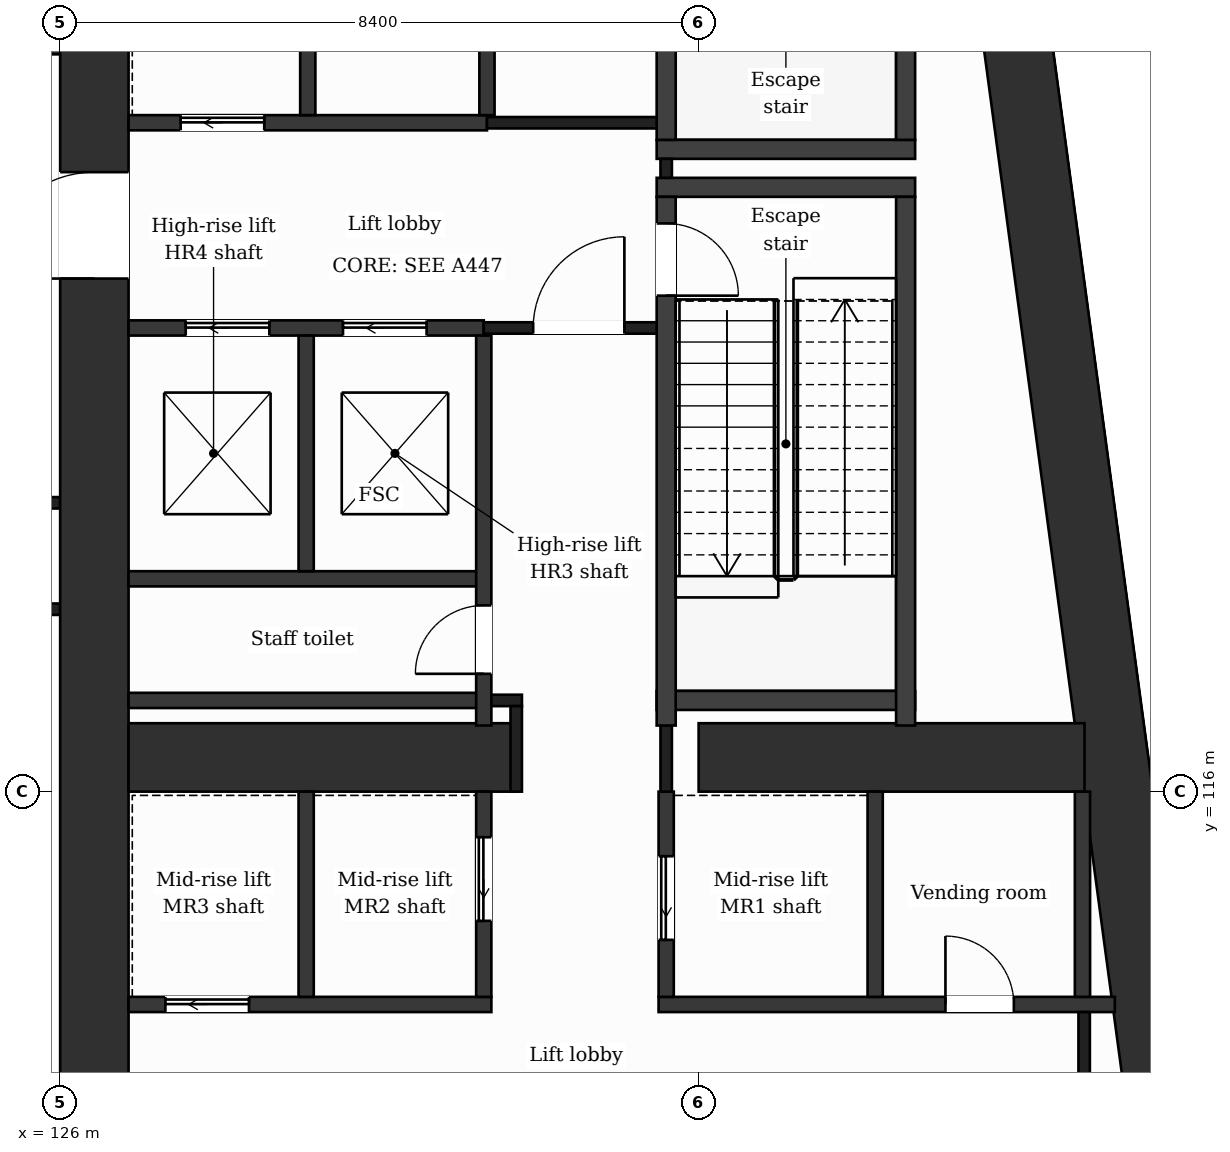
"""IFC4 building model, lengths in metres.
Left out: names, types, materials, properties, quantities, classifications, styles, units other than length and angle.
Written with IfcOpenShell. Run it as: python <this file> out.ifc"""

import sys

from ifc_helpers import new_model, si_unit, direction, frame, frame_2d, origin, place, context, subcontext, project, spatial, rectangle, extrude, element, fill, save


model = new_model("IFC4")
c1 = context("Model", 3, precision=1e-05, world=origin(), true_north=direction((0.0, 1.0)))
c2 = subcontext(c1, "Body", "Model", "MODEL_VIEW")
j1 = project(units=[si_unit("LENGTHUNIT", "METRE"), si_unit("PLANEANGLEUNIT", "RADIAN")], contexts=[c1])
p1 = place(None, origin())
s1 = spatial("IfcSite", under=j1, at=p1, CompositionType="ELEMENT")
p2 = place(p1, origin())
s2 = spatial("IfcBuilding", under=s1, at=p2, CompositionType="ELEMENT")
p3 = place(p2, frame((0.0, 0.0, 192.2)))
s3 = spatial("IfcBuildingStorey", under=s2, at=p3, CompositionType="ELEMENT", Elevation=192.2)
p4 = place(p3, frame((137.776, 131.95, 0.0), z_axis=(0.0, 0.0, 1.0), x_axis=(0.133421759112, -0.991059349482, 0.0)))
e1 = element("IfcWall", 1, at=p4, inside=s3, PredefinedType="SHEAR", context=c2, shape_type="SweptSolid", body=[
    extrude(rectangle(XDim=21.29, YDim=0.9, at=frame_2d((10.645, 0.0))), origin(), (0.0, 0.0, 1.0), 5.0),
])
p5 = place(p3, frame((126.45, 110.85, 0.0), z_axis=(0.0, 0.0, 1.0), x_axis=(0.0, 1.0, 0.0)))
e2 = element("IfcWall", 2, at=p5, inside=s3, PredefinedType="SHEAR", context=c2, shape_type="SweptSolid", body=[
    extrude(rectangle(XDim=21.1, YDim=0.9, at=frame_2d((10.55, 0.0))), origin(), (0.0, 0.0, 1.0), 5.0),
])
p6 = place(p5, frame((11.9, 0.0, 0.0)))
e3 = element("IfcOpeningElement", 3, at=p6, cuts=e2, PredefinedType="OPENING", context=c2, shape_type="SweptSolid", body=[
    extrude(rectangle(XDim=1.4, YDim=2.1, at=frame_2d((0.7, 1.05))), frame((0.0, 0.46, 0.0), z_axis=(0.0, -1.0, 0.0), x_axis=(1.0, 0.0, 0.0)), (0.0, 0.0, 1.0), 0.92),
])
p7 = place(p3, frame((126.9, 116.45, 0.0), z_axis=(0.0, 0.0, 1.0), x_axis=(1.0, 0.0, 0.0)))
e4 = element("IfcWall", 4, at=p7, inside=s3, PredefinedType="SHEAR", context=c2, shape_type="SweptSolid", body=[
    extrude(rectangle(XDim=5.1, YDim=0.9, at=frame_2d((2.55, 0.0))), origin(), (0.0, 0.0, 1.0), 5.0),
])
p8 = place(p3, frame((134.4, 116.45, 0.0), z_axis=(0.0, 0.0, 1.0), x_axis=(1.0, 0.0, 0.0)))
e5 = element("IfcWall", 5, at=p8, inside=s3, PredefinedType="SHEAR", context=c2, shape_type="SweptSolid", body=[
    extrude(rectangle(XDim=5.077, YDim=0.9, at=frame_2d((2.539, 0.0))), origin(), (0.0, 0.0, 1.0), 5.0),
])
p9 = place(p3, frame((126.9, 113.2, 0.0), z_axis=(0.0, 0.0, 1.0), x_axis=(1.0, 0.0, 0.0)))
e6 = element("IfcWall", 6, at=p9, inside=s3, PredefinedType="PARTITIONING", context=c2, shape_type="SweptSolid", body=[
    extrude(rectangle(XDim=4.773, YDim=0.2, at=frame_2d((2.387, 0.0))), origin(), (0.0, 0.0, 1.0), 4.5),
])
p10 = place(p9, frame((0.484, 0.0, 0.0)))
e7 = element("IfcOpeningElement", 7, at=p10, cuts=e6, PredefinedType="OPENING", context=c2, shape_type="SweptSolid", body=[
    extrude(rectangle(XDim=1.1, YDim=2.1, at=frame_2d((0.55, 1.05))), frame((0.0, 0.11, 0.0), z_axis=(0.0, -1.0, 0.0), x_axis=(1.0, 0.0, 0.0)), (0.0, 0.0, 1.0), 0.22),
])
p11 = place(p3, frame((133.873, 113.2, 0.0), z_axis=(0.0, 0.0, 1.0), x_axis=(1.0, 0.0, 0.0)))
e8 = element("IfcWall", 8, at=p11, inside=s3, PredefinedType="PARTITIONING", context=c2, shape_type="SweptSolid", body=[
    extrude(rectangle(XDim=6.003, YDim=0.2, at=frame_2d((3.001, 0.0))), origin(), (0.0, 0.0, 1.0), 4.5),
])
p12 = place(p11, frame((3.774, 0.0, 0.0)))
e9 = element("IfcOpeningElement", 9, at=p12, cuts=e8, PredefinedType="OPENING", context=c2, shape_type="SweptSolid", body=[
    extrude(rectangle(XDim=0.9, YDim=2.1, at=frame_2d((0.45, 1.05))), frame((0.0, 0.11, 0.0), z_axis=(0.0, -1.0, 0.0), x_axis=(1.0, 0.0, 0.0)), (0.0, 0.0, 1.0), 0.22),
])
p13 = place(p3, frame((126.9, 117.2, 0.0), z_axis=(0.0, 0.0, 1.0), x_axis=(1.0, 0.0, 0.0)))
e10 = element("IfcWall", 10, at=p13, inside=s3, PredefinedType="PARTITIONING", context=c2, shape_type="SweptSolid", body=[
    extrude(rectangle(XDim=4.673, YDim=0.2, at=frame_2d((2.336, 0.0))), origin(), (0.0, 0.0, 1.0), 4.5),
])
p14 = place(p3, frame((131.573, 117.2, 0.0), z_axis=(0.0, 0.0, 1.0), x_axis=(1.0, 0.0, 0.0)))
e11 = element("IfcWall", 11, at=p14, inside=s3, PredefinedType="PARTITIONING", context=c2, shape_type="SweptSolid", body=[
    extrude(rectangle(XDim=0.502, YDim=0.15, at=frame_2d((0.251, 0.0))), origin(), (0.0, 0.0, 1.0), 4.5),
])
p15 = place(p3, frame((133.848, 117.2, 0.0), z_axis=(0.0, 0.0, 1.0), x_axis=(1.0, 0.0, 0.0)))
e12 = element("IfcWall", 12, at=p15, inside=s3, PredefinedType="PARTITIONING", context=c2, shape_type="SweptSolid", body=[
    extrude(rectangle(XDim=3.4, YDim=0.25, at=frame_2d((1.7, 0.0))), origin(), (0.0, 0.0, 1.0), 4.5),
])
p16 = place(p3, frame((107.925, 118.4, 0.0), z_axis=(0.0, 0.0, 1.0), x_axis=(1.0, 0.0, 0.0)))
e13 = element("IfcWall", 13, at=p16, inside=s3, PredefinedType="PARTITIONING", context=c2, shape_type="SweptSolid", body=[
    extrude(rectangle(XDim=18.075, YDim=0.15, at=frame_2d((9.038, 0.0))), origin(), (0.0, 0.0, 1.0), 4.5),
])
p17 = place(p16, frame((8.475, 0.0, 0.0)))
e14 = element("IfcOpeningElement", 14, at=p17, cuts=e13, PredefinedType="OPENING", context=c2, shape_type="SweptSolid", body=[
    extrude(rectangle(XDim=1.2, YDim=2.1, at=frame_2d((0.6, 1.05))), frame((0.0, 0.085, 0.0), z_axis=(0.0, -1.0, 0.0), x_axis=(1.0, 0.0, 0.0)), (0.0, 0.0, 1.0), 0.17),
])
p18 = place(p3, frame((126.9, 118.8, 0.0), z_axis=(0.0, 0.0, 1.0), x_axis=(1.0, 0.0, 0.0)))
e15 = element("IfcWall", 15, at=p18, inside=s3, PredefinedType="PARTITIONING", context=c2, shape_type="SweptSolid", body=[
    extrude(rectangle(XDim=4.673, YDim=0.2, at=frame_2d((2.336, 0.0))), origin(), (0.0, 0.0, 1.0), 4.5),
])
p19 = place(p3, frame((120.125, 119.8, 0.0), z_axis=(0.0, 0.0, 1.0), x_axis=(1.0, 0.0, 0.0)))
e16 = element("IfcWall", 16, at=p19, inside=s3, PredefinedType="PARTITIONING", context=c2, shape_type="SweptSolid", body=[
    extrude(rectangle(XDim=5.875, YDim=0.15, at=frame_2d((2.938, 0.0))), origin(), (0.0, 0.0, 1.0), 4.5),
])
p20 = place(p3, frame((126.9, 122.1, 0.0), z_axis=(0.0, 0.0, 1.0), x_axis=(1.0, 0.0, 0.0)))
e17 = element("IfcWall", 17, at=p20, inside=s3, PredefinedType="PARTITIONING", context=c2, shape_type="SweptSolid", body=[
    extrude(rectangle(XDim=4.673, YDim=0.2, at=frame_2d((2.336, 0.0))), origin(), (0.0, 0.0, 1.0), 4.5),
])
p21 = place(p20, frame((2.821, 0.0, 0.0)))
e18 = element("IfcOpeningElement", 18, at=p21, cuts=e17, PredefinedType="OPENING", context=c2, shape_type="SweptSolid", body=[
    extrude(rectangle(XDim=1.1, YDim=2.1, at=frame_2d((0.55, 1.05))), frame((0.0, 0.11, 0.0), z_axis=(0.0, -1.0, 0.0), x_axis=(1.0, 0.0, 0.0)), (0.0, 0.0, 1.0), 0.22),
])
p22 = place(p20, frame((0.752, 0.0, 0.0)))
e19 = element("IfcOpeningElement", 19, at=p22, cuts=e17, PredefinedType="OPENING", context=c2, shape_type="SweptSolid", body=[
    extrude(rectangle(XDim=1.1, YDim=2.1, at=frame_2d((0.55, 1.05))), frame((0.0, 0.11, 0.0), z_axis=(0.0, -1.0, 0.0), x_axis=(1.0, 0.0, 0.0)), (0.0, 0.0, 1.0), 0.22),
])
p23 = place(p3, frame((131.573, 122.1, 0.0), z_axis=(0.0, 0.0, 1.0), x_axis=(1.0, 0.0, 0.0)))
e20 = element("IfcWall", 20, at=p23, inside=s3, PredefinedType="PARTITIONING", context=c2, shape_type="SweptSolid", body=[
    extrude(rectangle(XDim=2.4, YDim=0.15, at=frame_2d((1.2, 0.0))), origin(), (0.0, 0.0, 1.0), 4.5),
])
p24 = place(p23, frame((0.65, 0.0, 0.0)))
e21 = element("IfcOpeningElement", 21, at=p24, cuts=e20, PredefinedType="OPENING", context=c2, shape_type="SweptSolid", body=[
    extrude(rectangle(XDim=1.2, YDim=2.1, at=frame_2d((0.6, 1.05))), frame((0.0, 0.085, 0.0), z_axis=(0.0, -1.0, 0.0), x_axis=(1.0, 0.0, 0.0)), (0.0, 0.0, 1.0), 0.17),
])
for number, where, z_axis, x_axis in (
    (22, (133.848, 123.95, 0.0), (0.0, 0.0, 1.0), (1.0, 0.0, 0.0)),
    (23, (133.848, 124.45, 0.0), (0.0, 0.0, 1.0), (1.0, 0.0, 0.0)),
):
    element("IfcWall", number, at=place(p3, frame(where, z_axis=z_axis, x_axis=x_axis)), inside=s3, PredefinedType="PARTITIONING", context=c2, shape_type="SweptSolid", body=[
        extrude(rectangle(XDim=3.4, YDim=0.25, at=frame_2d((1.7, 0.0))), origin(), (0.0, 0.0, 1.0), 4.5),
    ])
p25 = place(p3, frame((126.9, 124.8, 0.0), z_axis=(0.0, 0.0, 1.0), x_axis=(1.0, 0.0, 0.0)))
e24 = element("IfcWall", 24, at=p25, inside=s3, PredefinedType="PARTITIONING", context=c2, shape_type="SweptSolid", body=[
    extrude(rectangle(XDim=4.715, YDim=0.2, at=frame_2d((2.358, 0.0))), origin(), (0.0, 0.0, 1.0), 4.5),
])
p26 = place(p25, frame((0.685, 0.0, 0.0)))
e25 = element("IfcOpeningElement", 25, at=p26, cuts=e24, PredefinedType="OPENING", context=c2, shape_type="SweptSolid", body=[
    extrude(rectangle(XDim=1.1, YDim=2.1, at=frame_2d((0.55, 1.05))), frame((0.0, 0.11, 0.0), z_axis=(0.0, -1.0, 0.0), x_axis=(1.0, 0.0, 0.0)), (0.0, 0.0, 1.0), 0.22),
])
p27 = place(p3, frame((131.615, 124.8, 0.0), z_axis=(0.0, 0.0, 1.0), x_axis=(1.0, 0.0, 0.0)))
e26 = element("IfcWall", 26, at=p27, inside=s3, PredefinedType="PARTITIONING", context=c2, shape_type="SweptSolid", body=[
    extrude(rectangle(XDim=2.483, YDim=0.15, at=frame_2d((1.241, 0.0))), origin(), (0.0, 0.0, 1.0), 4.5),
])
p28 = place(p3, frame((120.2, 125.8, 0.0), z_axis=(0.0, 0.0, 1.0), x_axis=(1.0, 0.0, 0.0)))
e27 = element("IfcWall", 27, at=p28, inside=s3, PredefinedType="PARTITIONING", context=c2, shape_type="SweptSolid", body=[
    extrude(rectangle(XDim=5.8, YDim=0.2, at=frame_2d((2.9, 0.0))), origin(), (0.0, 0.0, 1.0), 4.5),
])
p29 = place(p3, frame((129.237, 113.3, 0.0), z_axis=(0.0, 0.0, 1.0), x_axis=(0.0, 1.0, 0.0)))
e28 = element("IfcWall", 28, at=p29, inside=s3, PredefinedType="PARTITIONING", context=c2, shape_type="SweptSolid", body=[
    extrude(rectangle(XDim=2.7, YDim=0.2, at=frame_2d((1.35, 0.0))), origin(), (0.0, 0.0, 1.0), 4.5),
])
for number, where, z_axis, x_axis in (
    (29, (129.237, 118.9, 0.0), (0.0, 0.0, 1.0), (0.0, 1.0, 0.0)),
    (30, (129.258, 124.9, 0.0), (0.0, 0.0, 1.0), (0.0, 1.0, 0.0)),
):
    element("IfcWall", number, at=place(p3, frame(where, z_axis=z_axis, x_axis=x_axis)), inside=s3, PredefinedType="PARTITIONING", context=c2, shape_type="SweptSolid", body=[
        extrude(rectangle(XDim=3.1, YDim=0.2, at=frame_2d((1.55, 0.0))), origin(), (0.0, 0.0, 1.0), 4.5),
    ])
p30 = place(p3, frame((131.573, 113.3, 0.0), z_axis=(0.0, 0.0, 1.0), x_axis=(0.0, 1.0, 0.0)))
e31 = element("IfcWall", 31, at=p30, inside=s3, PredefinedType="PARTITIONING", context=c2, shape_type="SweptSolid", body=[
    extrude(rectangle(XDim=2.7, YDim=0.2, at=frame_2d((1.35, 0.0))), origin(), (0.0, 0.0, 1.0), 4.5),
])
p31 = place(p30, frame((1.0, 0.0, 0.0)))
e32 = element("IfcOpeningElement", 32, at=p31, cuts=e31, PredefinedType="OPENING", context=c2, shape_type="SweptSolid", body=[
    extrude(rectangle(XDim=1.1, YDim=2.1, at=frame_2d((0.55, 1.05))), frame((0.0, 0.11, 0.0), z_axis=(0.0, -1.0, 0.0), x_axis=(1.0, 0.0, 0.0)), (0.0, 0.0, 1.0), 0.22),
])
p32 = place(p3, frame((131.573, 116.87, 0.0), z_axis=(0.0, 0.0, 1.0), x_axis=(0.0, 1.0, 0.0)))
e33 = element("IfcWall", 33, at=p32, inside=s3, PredefinedType="PARTITIONING", context=c2, shape_type="SweptSolid", body=[
    extrude(rectangle(XDim=5.13, YDim=0.2, at=frame_2d((2.565, 0.0))), origin(), (0.0, 0.0, 1.0), 4.5),
])
p33 = place(p32, frame((0.68, 0.0, 0.0)))
e34 = element("IfcOpeningElement", 34, at=p33, cuts=e33, PredefinedType="OPENING", context=c2, shape_type="SweptSolid", body=[
    extrude(rectangle(XDim=0.9, YDim=2.1, at=frame_2d((0.45, 1.05))), frame((0.0, 0.11, 0.0), z_axis=(0.0, -1.0, 0.0), x_axis=(1.0, 0.0, 0.0)), (0.0, 0.0, 1.0), 0.22),
])
p34 = place(p3, frame((131.615, 124.9, 0.0), z_axis=(0.0, 0.0, 1.0), x_axis=(0.0, 1.0, 0.0)))
e35 = element("IfcWall", 35, at=p34, inside=s3, PredefinedType="PARTITIONING", context=c2, shape_type="SweptSolid", body=[
    extrude(rectangle(XDim=3.1, YDim=0.2, at=frame_2d((1.55, 0.0))), origin(), (0.0, 0.0, 1.0), 4.5),
])
p35 = place(p3, frame((132.0, 116.0, 0.0), z_axis=(0.0, 0.0, 1.0), x_axis=(0.0, 1.0, 0.0)))
e36 = element("IfcWall", 36, at=p35, inside=s3, PredefinedType="PARTITIONING", context=c2, shape_type="SweptSolid", body=[
    extrude(rectangle(XDim=1.125, YDim=0.15, at=frame_2d((0.562, 0.0))), origin(), (0.0, 0.0, 1.0), 4.5),
])
p36 = place(p3, frame((133.973, 113.3, 0.0), z_axis=(0.0, 0.0, 1.0), x_axis=(0.0, 1.0, 0.0)))
e37 = element("IfcWall", 37, at=p36, inside=s3, PredefinedType="PARTITIONING", context=c2, shape_type="SweptSolid", body=[
    extrude(rectangle(XDim=2.7, YDim=0.2, at=frame_2d((1.35, 0.0))), origin(), (0.0, 0.0, 1.0), 4.5),
])
p37 = place(p36, frame((0.75, 0.0, 0.0)))
e38 = element("IfcOpeningElement", 38, at=p37, cuts=e37, PredefinedType="OPENING", context=c2, shape_type="SweptSolid", body=[
    extrude(rectangle(XDim=1.1, YDim=2.1, at=frame_2d((0.55, 1.05))), frame((0.0, 0.11, 0.0), z_axis=(0.0, -1.0, 0.0), x_axis=(1.0, 0.0, 0.0)), (0.0, 0.0, 1.0), 0.22),
])
p38 = place(p3, frame((133.973, 116.0, 0.0), z_axis=(0.0, 0.0, 1.0), x_axis=(0.0, 1.0, 0.0)))
e39 = element("IfcWall", 39, at=p38, inside=s3, PredefinedType="PARTITIONING", context=c2, shape_type="SweptSolid", body=[
    extrude(rectangle(XDim=0.87, YDim=0.15, at=frame_2d((0.435, 0.0))), origin(), (0.0, 0.0, 1.0), 4.5),
])
p39 = place(p3, frame((133.973, 124.075, 0.0), z_axis=(0.0, 0.0, 1.0), x_axis=(0.0, 1.0, 0.0)))
e40 = element("IfcWall", 40, at=p39, inside=s3, PredefinedType="PARTITIONING", context=c2, shape_type="SweptSolid", body=[
    extrude(rectangle(XDim=0.25, YDim=0.15, at=frame_2d((0.125, 0.0))), origin(), (0.0, 0.0, 1.0), 4.5),
])
p40 = place(p3, frame((133.973, 116.87, 0.0), z_axis=(0.0, 0.0, 1.0), x_axis=(0.0, 1.0, 0.0)))
e41 = element("IfcWall", 41, at=p40, inside=s3, PredefinedType="PARTITIONING", context=c2, shape_type="SweptSolid", body=[
    extrude(rectangle(XDim=6.955, YDim=0.25, at=frame_2d((3.478, 0.0))), origin(), (0.0, 0.0, 1.0), 4.5),
])
p41 = place(p40, frame((5.655, 0.0, 0.0)))
e42 = element("IfcOpeningElement", 42, at=p41, cuts=e41, PredefinedType="OPENING", context=c2, shape_type="SweptSolid", body=[
    extrude(rectangle(XDim=0.95, YDim=2.1, at=frame_2d((0.475, 1.05))), frame((0.0, 0.135, 0.0), z_axis=(0.0, -1.0, 0.0), x_axis=(1.0, 0.0, 0.0)), (0.0, 0.0, 1.0), 0.27),
])
p42 = place(p3, frame((133.973, 124.575, 0.0), z_axis=(0.0, 0.0, 1.0), x_axis=(0.0, 1.0, 0.0)))
e43 = element("IfcWall", 43, at=p42, inside=s3, PredefinedType="PARTITIONING", context=c2, shape_type="SweptSolid", body=[
    extrude(rectangle(XDim=6.955, YDim=0.25, at=frame_2d((3.478, 0.0))), origin(), (0.0, 0.0, 1.0), 4.5),
])
p43 = place(p42, frame((5.325, 0.0, 0.0)))
e44 = element("IfcOpeningElement", 44, at=p43, cuts=e43, PredefinedType="OPENING", context=c2, shape_type="SweptSolid", body=[
    extrude(rectangle(XDim=1.0, YDim=2.1, at=frame_2d((0.5, 1.05))), frame((0.0, 0.135, 0.0), z_axis=(0.0, -1.0, 0.0), x_axis=(1.0, 0.0, 0.0)), (0.0, 0.0, 1.0), 0.27),
])
p44 = place(p3, frame((136.722, 113.3, 0.0), z_axis=(0.0, 0.0, 1.0), x_axis=(0.0, 1.0, 0.0)))
e45 = element("IfcWall", 45, at=p44, inside=s3, PredefinedType="PARTITIONING", context=c2, shape_type="SweptSolid", body=[
    extrude(rectangle(XDim=2.7, YDim=0.2, at=frame_2d((1.35, 0.0))), origin(), (0.0, 0.0, 1.0), 4.5),
])
p45 = place(p3, frame((137.123, 116.87, 0.0), z_axis=(0.0, 0.0, 1.0), x_axis=(0.0, 1.0, 0.0)))
e46 = element("IfcWall", 46, at=p45, inside=s3, PredefinedType="PARTITIONING", context=c2, shape_type="SweptSolid", body=[
    extrude(rectangle(XDim=6.955, YDim=0.25, at=frame_2d((3.478, 0.0))), origin(), (0.0, 0.0, 1.0), 4.5),
])
p46 = place(p3, frame((137.123, 124.575, 0.0), z_axis=(0.0, 0.0, 1.0), x_axis=(0.0, 1.0, 0.0)))
e47 = element("IfcWall", 47, at=p46, inside=s3, PredefinedType="PARTITIONING", context=c2, shape_type="SweptSolid", body=[
    extrude(rectangle(XDim=6.955, YDim=0.25, at=frame_2d((3.478, 0.0))), origin(), (0.0, 0.0, 1.0), 4.5),
])
p47 = place(p3, frame((139.45, 113.3, 0.0), z_axis=(0.0, 0.0, 1.0), x_axis=(0.0, 1.0, 0.0)))
e48 = element("IfcWall", 48, at=p47, inside=s3, PredefinedType="PARTITIONING", context=c2, shape_type="SweptSolid", body=[
    extrude(rectangle(XDim=2.7, YDim=0.2, at=frame_2d((1.35, 0.0))), origin(), (0.0, 0.0, 1.0), 4.5),
])
p48 = place(p3, frame((139.472, 111.3, 0.0), z_axis=(0.0, 0.0, 1.0), x_axis=(0.0, 1.0, 0.0)))
e49 = element("IfcWall", 49, at=p48, inside=s3, PredefinedType="PARTITIONING", context=c2, shape_type="SweptSolid", body=[
    extrude(rectangle(XDim=1.8, YDim=0.15, at=frame_2d((0.9, 0.0))), origin(), (0.0, 0.0, 1.0), 4.5),
])
p49 = place(p24, origin())
e50 = element("IfcDoor", 50, at=p49, inside=s3, OperationType="SINGLE_SWING_RIGHT", PredefinedType="DOOR", context=c2, shape_type="SweptSolid", body=[
    extrude(rectangle(XDim=1.2, YDim=2.1, at=frame_2d((0.6, 1.05))), frame((0.0, 0.025, 0.0), z_axis=(0.0, -1.0, 0.0), x_axis=(1.0, 0.0, 0.0)), (0.0, 0.0, 1.0), 0.05),
])
fill(e21, e50)
p50 = place(p21, origin())
e51 = element("IfcDoor", 51, at=p50, inside=s3, OperationType="SLIDING_TO_LEFT", PredefinedType="DOOR", context=c2, shape_type="SweptSolid", body=[
    extrude(rectangle(XDim=1.1, YDim=2.1, at=frame_2d((0.55, 1.05))), frame((0.0, 0.025, 0.0), z_axis=(0.0, -1.0, 0.0), x_axis=(1.0, 0.0, 0.0)), (0.0, 0.0, 1.0), 0.05),
])
fill(e18, e51)
p51 = place(p22, origin())
e52 = element("IfcDoor", 52, at=p51, inside=s3, OperationType="SLIDING_TO_LEFT", PredefinedType="DOOR", context=c2, shape_type="SweptSolid", body=[
    extrude(rectangle(XDim=1.1, YDim=2.1, at=frame_2d((0.55, 1.05))), frame((0.0, 0.025, 0.0), z_axis=(0.0, -1.0, 0.0), x_axis=(1.0, 0.0, 0.0)), (0.0, 0.0, 1.0), 0.05),
])
fill(e19, e52)
p52 = place(p26, origin())
e53 = element("IfcDoor", 53, at=p52, inside=s3, OperationType="SLIDING_TO_LEFT", PredefinedType="DOOR", context=c2, shape_type="SweptSolid", body=[
    extrude(rectangle(XDim=1.1, YDim=2.1, at=frame_2d((0.55, 1.05))), frame((0.0, 0.025, 0.0), z_axis=(0.0, -1.0, 0.0), x_axis=(1.0, 0.0, 0.0)), (0.0, 0.0, 1.0), 0.05),
])
fill(e25, e53)
p53 = place(p41, origin())
e54 = element("IfcDoor", 54, at=p53, inside=s3, OperationType="SINGLE_SWING_LEFT", PredefinedType="DOOR", context=c2, shape_type="SweptSolid", body=[
    extrude(rectangle(XDim=0.95, YDim=2.1, at=frame_2d((0.475, 1.05))), frame((0.0, 0.025, 0.0), z_axis=(0.0, -1.0, 0.0), x_axis=(1.0, 0.0, 0.0)), (0.0, 0.0, 1.0), 0.05),
])
fill(e42, e54)
p54 = place(p33, origin())
e55 = element("IfcDoor", 55, at=p54, inside=s3, OperationType="SINGLE_SWING_LEFT", PredefinedType="DOOR", context=c2, shape_type="SweptSolid", body=[
    extrude(rectangle(XDim=0.9, YDim=2.1, at=frame_2d((0.45, 1.05))), frame((0.0, 0.025, 0.0), z_axis=(0.0, -1.0, 0.0), x_axis=(1.0, 0.0, 0.0)), (0.0, 0.0, 1.0), 0.05),
])
fill(e34, e55)
p55 = place(p37, origin())
e56 = element("IfcDoor", 56, at=p55, inside=s3, OperationType="SLIDING_TO_LEFT", PredefinedType="DOOR", context=c2, shape_type="SweptSolid", body=[
    extrude(rectangle(XDim=1.1, YDim=2.1, at=frame_2d((0.55, 1.05))), frame((0.0, 0.025, 0.0), z_axis=(0.0, -1.0, 0.0), x_axis=(1.0, 0.0, 0.0)), (0.0, 0.0, 1.0), 0.05),
])
fill(e38, e56)
p56 = place(p31, origin())
e57 = element("IfcDoor", 57, at=p56, inside=s3, OperationType="SLIDING_TO_LEFT", PredefinedType="DOOR", context=c2, shape_type="SweptSolid", body=[
    extrude(rectangle(XDim=1.1, YDim=2.1, at=frame_2d((0.55, 1.05))), frame((0.0, 0.025, 0.0), z_axis=(0.0, -1.0, 0.0), x_axis=(1.0, 0.0, 0.0)), (0.0, 0.0, 1.0), 0.05),
])
fill(e32, e57)
p57 = place(p10, origin())
e58 = element("IfcDoor", 58, at=p57, inside=s3, OperationType="SLIDING_TO_LEFT", PredefinedType="DOOR", context=c2, shape_type="SweptSolid", body=[
    extrude(rectangle(XDim=1.1, YDim=2.1, at=frame_2d((0.55, 1.05))), frame((0.0, 0.025, 0.0), z_axis=(0.0, -1.0, 0.0), x_axis=(1.0, 0.0, 0.0)), (0.0, 0.0, 1.0), 0.05),
])
fill(e7, e58)
p58 = place(p12, origin())
e59 = element("IfcDoor", 59, at=p58, inside=s3, OperationType="SINGLE_SWING_LEFT", PredefinedType="DOOR", context=c2, shape_type="SweptSolid", body=[
    extrude(rectangle(XDim=0.9, YDim=2.1, at=frame_2d((0.45, 1.05))), frame((0.0, 0.025, 0.0), z_axis=(0.0, -1.0, 0.0), x_axis=(1.0, 0.0, 0.0)), (0.0, 0.0, 1.0), 0.05),
])
fill(e9, e59)
p59 = place(p6, origin())
e60 = element("IfcDoor", 60, at=p59, inside=s3, OperationType="SINGLE_SWING_LEFT", PredefinedType="DOOR", context=c2, shape_type="SweptSolid", body=[
    extrude(rectangle(XDim=1.4, YDim=2.1, at=frame_2d((0.7, 1.05))), frame((0.0, 0.025, 0.0), z_axis=(0.0, -1.0, 0.0), x_axis=(1.0, 0.0, 0.0)), (0.0, 0.0, 1.0), 0.05),
])
fill(e3, e60)
save(model, sys.argv[1])
